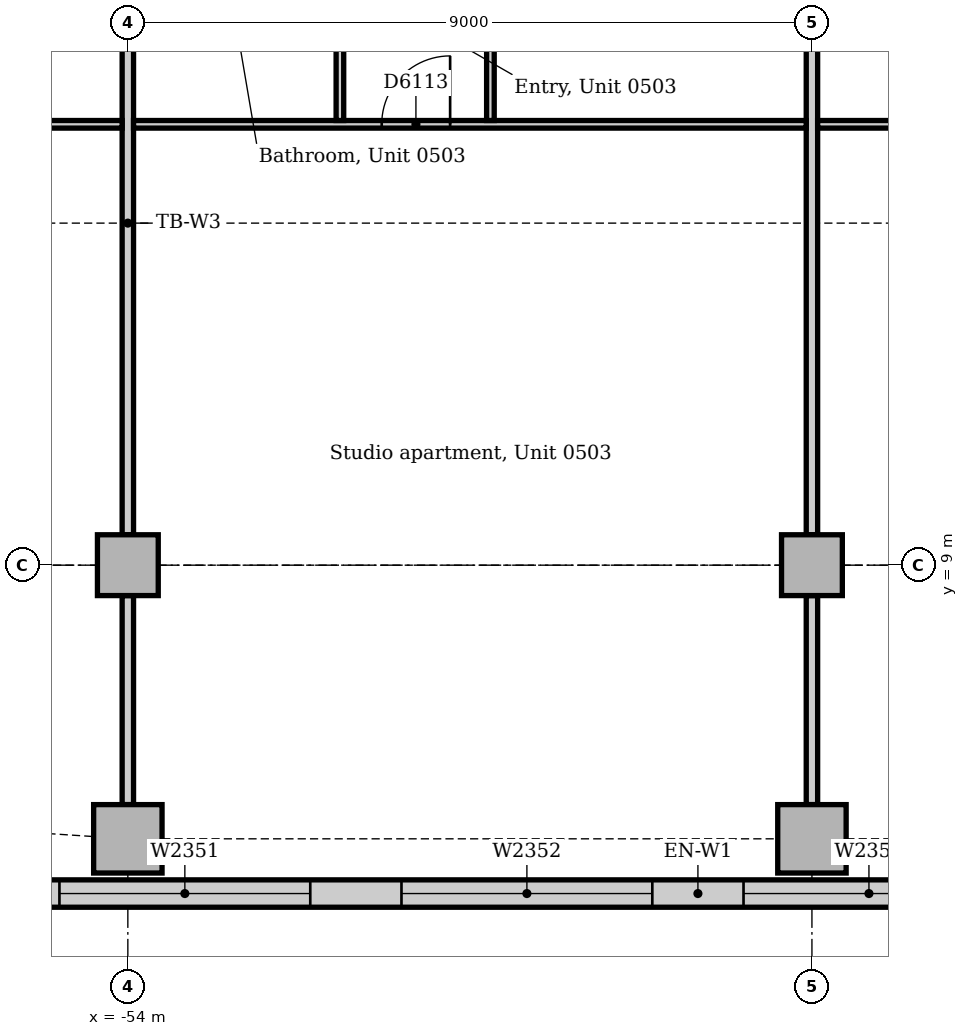
"""IFC4 building model, lengths in metres.
Left out: names, types, materials, properties, quantities, classifications, styles, units other than length and angle.
Written with IfcOpenShell. Run it as: python <this file> out.ifc"""

import sys

from ifc_helpers import new_model, si_unit, direction, frame, frame_2d, origin, origin_2d, place, context, subcontext, project, spatial, rectangle, extrude, element, fill, save


model = new_model("IFC4")
c1 = context("Model", 3, precision=1e-05, world=origin(), true_north=direction((0.0, 1.0)))
c2 = subcontext(c1, "Body", "Model", "MODEL_VIEW")
j1 = project(units=[si_unit("LENGTHUNIT", "METRE"), si_unit("PLANEANGLEUNIT", "RADIAN")], contexts=[c1])
p1 = place(None, origin())
s1 = spatial("IfcSite", under=j1, at=p1, CompositionType="ELEMENT")
p2 = place(p1, origin())
s2 = spatial("IfcBuilding", under=s1, at=p2, CompositionType="ELEMENT")
p3 = place(p2, frame((0.0, 0.0, 26.0)))
s3 = spatial("IfcBuildingStorey", under=s2, at=p3, CompositionType="ELEMENT", Elevation=26.0)
for number, where, z_axis, x_axis in (
    (1, (-54.0, 5.4, 0.0), (0.0, 0.0, 1.0), (1.0, 0.0, 0.0)),
    (2, (-45.0, 5.4, 0.0), (0.0, 0.0, 1.0), (1.0, 0.0, 0.0)),
):
    element("IfcColumn", number, at=place(p3, frame(where, z_axis=z_axis, x_axis=x_axis)), inside=s3, PredefinedType="COLUMN", context=c2, shape_type="SweptSolid", body=[
        extrude(rectangle(XDim=0.9, YDim=0.9, at=origin_2d()), origin(), (0.0, 0.0, 1.0), 3.85),
    ])
for number, where, z_axis, x_axis in (
    (3, (-54.0, 9.0, 0.0), (0.0, 0.0, 1.0), (1.0, 0.0, 0.0)),
    (4, (-45.0, 9.0, 0.0), (0.0, 0.0, 1.0), (1.0, 0.0, 0.0)),
):
    element("IfcColumn", number, at=place(p3, frame(where, z_axis=z_axis, x_axis=x_axis)), inside=s3, PredefinedType="COLUMN", context=c2, shape_type="SweptSolid", body=[
        extrude(rectangle(XDim=0.8, YDim=0.8, at=origin_2d()), origin(), (0.0, 0.0, 1.0), 3.85),
    ])
p4 = place(p3, frame((-61.757, 4.68, 0.0), z_axis=(0.0, 0.0, 1.0), x_axis=(1.0, 0.0, 0.0)))
e5 = element("IfcWall", 5, at=p4, inside=s3, PredefinedType="STANDARD", context=c2, shape_type="SweptSolid", body=[
    extrude(rectangle(XDim=30.515, YDim=0.36, at=frame_2d((15.257, 0.0))), origin(), (0.0, 0.0, 1.0), 3.85),
])
p5 = place(p4, frame((2.357, 0.0, 0.9)))
e6 = element("IfcOpeningElement", 6, at=p5, cuts=e5, PredefinedType="OPENING", context=c2, shape_type="SweptSolid", body=[
    extrude(rectangle(XDim=3.3, YDim=1.6, at=frame_2d((1.65, 0.8))), frame((0.0, 0.19, 0.0), z_axis=(0.0, -1.0, 0.0), x_axis=(1.0, 0.0, 0.0)), (0.0, 0.0, 1.0), 0.38),
])
p6 = place(p4, frame((6.857, 0.0, 0.9)))
e7 = element("IfcOpeningElement", 7, at=p6, cuts=e5, PredefinedType="OPENING", context=c2, shape_type="SweptSolid", body=[
    extrude(rectangle(XDim=3.3, YDim=1.6, at=frame_2d((1.65, 0.8))), frame((0.0, 0.19, 0.0), z_axis=(0.0, -1.0, 0.0), x_axis=(1.0, 0.0, 0.0)), (0.0, 0.0, 1.0), 0.38),
])
p7 = place(p4, frame((11.357, 0.0, 0.9)))
e8 = element("IfcOpeningElement", 8, at=p7, cuts=e5, PredefinedType="OPENING", context=c2, shape_type="SweptSolid", body=[
    extrude(rectangle(XDim=3.3, YDim=1.6, at=frame_2d((1.65, 0.8))), frame((0.0, 0.19, 0.0), z_axis=(0.0, -1.0, 0.0), x_axis=(1.0, 0.0, 0.0)), (0.0, 0.0, 1.0), 0.38),
])
p8 = place(p4, frame((15.857, 0.0, 0.9)))
e9 = element("IfcOpeningElement", 9, at=p8, cuts=e5, PredefinedType="OPENING", context=c2, shape_type="SweptSolid", body=[
    extrude(rectangle(XDim=3.3, YDim=1.6, at=frame_2d((1.65, 0.8))), frame((0.0, 0.19, 0.0), z_axis=(0.0, -1.0, 0.0), x_axis=(1.0, 0.0, 0.0)), (0.0, 0.0, 1.0), 0.38),
])
p9 = place(p4, frame((20.357, 0.0, 0.9)))
e10 = element("IfcOpeningElement", 10, at=p9, cuts=e5, PredefinedType="OPENING", context=c2, shape_type="SweptSolid", body=[
    extrude(rectangle(XDim=3.3, YDim=1.6, at=frame_2d((1.65, 0.8))), frame((0.0, 0.19, 0.0), z_axis=(0.0, -1.0, 0.0), x_axis=(1.0, 0.0, 0.0)), (0.0, 0.0, 1.0), 0.38),
])
p10 = place(p4, frame((24.857, 0.0, 0.9)))
e11 = element("IfcOpeningElement", 11, at=p10, cuts=e5, PredefinedType="OPENING", context=c2, shape_type="SweptSolid", body=[
    extrude(rectangle(XDim=3.3, YDim=1.6, at=frame_2d((1.65, 0.8))), frame((0.0, 0.19, 0.0), z_axis=(0.0, -1.0, 0.0), x_axis=(1.0, 0.0, 0.0)), (0.0, 0.0, 1.0), 0.38),
])
p11 = place(p3, frame((-54.0, 9.4, 0.0), z_axis=(0.0, 0.0, 1.0), x_axis=(0.0, 1.0, 0.0)))
e12 = element("IfcWall", 12, at=p11, inside=s3, PredefinedType="PARTITIONING", context=c2, shape_type="SweptSolid", body=[
    extrude(rectangle(XDim=8.2, YDim=0.15, at=frame_2d((4.1, 0.0))), origin(), (0.0, 0.0, 1.0), 3.158),
])
p12 = place(p3, frame((-54.0, 5.85, 0.0), z_axis=(0.0, 0.0, 1.0), x_axis=(0.0, 1.0, 0.0)))
e13 = element("IfcWall", 13, at=p12, inside=s3, PredefinedType="PARTITIONING", context=c2, shape_type="SweptSolid", body=[
    extrude(rectangle(XDim=2.75, YDim=0.15, at=frame_2d((1.375, 0.0))), origin(), (0.0, 0.0, 1.0), 3.652),
])
p13 = place(p3, frame((-45.0, 9.4, 0.0), z_axis=(0.0, 0.0, 1.0), x_axis=(0.0, 1.0, 0.0)))
e14 = element("IfcWall", 14, at=p13, inside=s3, PredefinedType="PARTITIONING", context=c2, shape_type="SweptSolid", body=[
    extrude(rectangle(XDim=8.2, YDim=0.15, at=frame_2d((4.1, 0.0))), origin(), (0.0, 0.0, 1.0), 3.158),
])
p14 = place(p3, frame((-45.0, 5.85, 0.0), z_axis=(0.0, 0.0, 1.0), x_axis=(0.0, 1.0, 0.0)))
e15 = element("IfcWall", 15, at=p14, inside=s3, PredefinedType="PARTITIONING", context=c2, shape_type="SweptSolid", body=[
    extrude(rectangle(XDim=2.75, YDim=0.15, at=frame_2d((1.375, 0.0))), origin(), (0.0, 0.0, 1.0), 3.652),
])
p15 = place(p3, frame((-61.05, 14.8, 0.0), z_axis=(0.0, 0.0, 1.0), x_axis=(1.0, 0.0, 0.0)))
e16 = element("IfcWall", 16, at=p15, inside=s3, PredefinedType="PARTITIONING", context=c2, shape_type="SweptSolid", body=[
    extrude(rectangle(XDim=6.975, YDim=0.1, at=frame_2d((3.487, 0.0))), origin(), (0.0, 0.0, 1.0), 3.85),
])
p16 = place(p15, frame((2.52, 0.0, 0.0)))
e17 = element("IfcOpeningElement", 17, at=p16, cuts=e16, PredefinedType="OPENING", context=c2, shape_type="SweptSolid", body=[
    extrude(rectangle(XDim=0.9, YDim=2.1, at=frame_2d((0.45, 1.05))), frame((0.0, 0.06, 0.0), z_axis=(0.0, -1.0, 0.0), x_axis=(1.0, 0.0, 0.0)), (0.0, 0.0, 1.0), 0.12),
])
p17 = place(p3, frame((-53.925, 14.8, 0.0), z_axis=(0.0, 0.0, 1.0), x_axis=(1.0, 0.0, 0.0)))
e18 = element("IfcWall", 18, at=p17, inside=s3, PredefinedType="PARTITIONING", context=c2, shape_type="SweptSolid", body=[
    extrude(rectangle(XDim=8.85, YDim=0.1, at=frame_2d((4.425, 0.0))), origin(), (0.0, 0.0, 1.0), 3.85),
])
p18 = place(p17, frame((3.265, 0.0, 0.0)))
e19 = element("IfcOpeningElement", 19, at=p18, cuts=e18, PredefinedType="OPENING", context=c2, shape_type="SweptSolid", body=[
    extrude(rectangle(XDim=0.9, YDim=2.1, at=frame_2d((0.45, 1.05))), frame((0.0, 0.06, 0.0), z_axis=(0.0, -1.0, 0.0), x_axis=(1.0, 0.0, 0.0)), (0.0, 0.0, 1.0), 0.12),
])
p19 = place(p3, frame((-44.925, 14.8, 0.0), z_axis=(0.0, 0.0, 1.0), x_axis=(1.0, 0.0, 0.0)))
e20 = element("IfcWall", 20, at=p19, inside=s3, PredefinedType="PARTITIONING", context=c2, shape_type="SweptSolid", body=[
    extrude(rectangle(XDim=8.85, YDim=0.1, at=frame_2d((4.425, 0.0))), origin(), (0.0, 0.0, 1.0), 3.85),
])
p20 = place(p19, frame((3.265, 0.0, 0.0)))
e21 = element("IfcOpeningElement", 21, at=p20, cuts=e20, PredefinedType="OPENING", context=c2, shape_type="SweptSolid", body=[
    extrude(rectangle(XDim=0.9, YDim=2.1, at=frame_2d((0.45, 1.05))), frame((0.0, 0.06, 0.0), z_axis=(0.0, -1.0, 0.0), x_axis=(1.0, 0.0, 0.0)), (0.0, 0.0, 1.0), 0.12),
])
p21 = place(p3, frame((-51.21, 14.85, 0.0), z_axis=(0.0, 0.0, 1.0), x_axis=(0.0, 1.0, 0.0)))
e22 = element("IfcWall", 22, at=p21, inside=s3, PredefinedType="PARTITIONING", context=c2, shape_type="SweptSolid", body=[
    extrude(rectangle(XDim=3.075, YDim=0.1, at=frame_2d((1.538, 0.0))), origin(), (0.0, 0.0, 1.0), 3.85),
])
p22 = place(p21, frame((1.1, 0.0, 0.0)))
e23 = element("IfcOpeningElement", 23, at=p22, cuts=e22, PredefinedType="OPENING", context=c2, shape_type="SweptSolid", body=[
    extrude(rectangle(XDim=0.9, YDim=2.1, at=frame_2d((0.45, 1.05))), frame((0.0, 0.06, 0.0), z_axis=(0.0, -1.0, 0.0), x_axis=(1.0, 0.0, 0.0)), (0.0, 0.0, 1.0), 0.12),
])
p23 = place(p3, frame((-49.23, 14.85, 0.0), z_axis=(0.0, 0.0, 1.0), x_axis=(0.0, 1.0, 0.0)))
e24 = element("IfcWall", 24, at=p23, inside=s3, PredefinedType="PARTITIONING", context=c2, shape_type="SweptSolid", body=[
    extrude(rectangle(XDim=3.075, YDim=0.1, at=frame_2d((1.538, 0.0))), origin(), (0.0, 0.0, 1.0), 3.85),
])
p24 = place(p23, frame((1.1, 0.0, 0.0)))
e25 = element("IfcOpeningElement", 25, at=p24, cuts=e24, PredefinedType="OPENING", context=c2, shape_type="SweptSolid", body=[
    extrude(rectangle(XDim=0.9, YDim=2.1, at=frame_2d((0.45, 1.05))), frame((0.0, 0.06, 0.0), z_axis=(0.0, -1.0, 0.0), x_axis=(1.0, 0.0, 0.0)), (0.0, 0.0, 1.0), 0.12),
])
p25 = place(p6, origin())
e26 = element("IfcWindow", 26, at=p25, inside=s3, PartitioningType="SINGLE_PANEL", PredefinedType="WINDOW", context=c2, shape_type="SweptSolid", body=[
    extrude(rectangle(XDim=3.3, YDim=1.6, at=frame_2d((1.65, 0.8))), frame((0.0, 0.13, 0.0), z_axis=(0.0, -1.0, 0.0), x_axis=(1.0, 0.0, 0.0)), (0.0, 0.0, 1.0), 0.06),
])
fill(e7, e26)
p26 = place(p7, origin())
e27 = element("IfcWindow", 27, at=p26, inside=s3, PartitioningType="SINGLE_PANEL", PredefinedType="WINDOW", context=c2, shape_type="SweptSolid", body=[
    extrude(rectangle(XDim=3.3, YDim=1.6, at=frame_2d((1.65, 0.8))), frame((0.0, 0.13, 0.0), z_axis=(0.0, -1.0, 0.0), x_axis=(1.0, 0.0, 0.0)), (0.0, 0.0, 1.0), 0.06),
])
fill(e8, e27)
p27 = place(p8, origin())
e28 = element("IfcWindow", 28, at=p27, inside=s3, PartitioningType="SINGLE_PANEL", PredefinedType="WINDOW", context=c2, shape_type="SweptSolid", body=[
    extrude(rectangle(XDim=3.3, YDim=1.6, at=frame_2d((1.65, 0.8))), frame((0.0, 0.13, 0.0), z_axis=(0.0, -1.0, 0.0), x_axis=(1.0, 0.0, 0.0)), (0.0, 0.0, 1.0), 0.06),
])
fill(e9, e28)
p28 = place(p18, origin())
e29 = element("IfcDoor", 29, at=p28, inside=s3, OperationType="SINGLE_SWING_RIGHT", PredefinedType="DOOR", context=c2, shape_type="SweptSolid", body=[
    extrude(rectangle(XDim=0.9, YDim=2.1, at=frame_2d((0.45, 1.05))), frame((0.0, 0.025, 0.0), z_axis=(0.0, -1.0, 0.0), x_axis=(1.0, 0.0, 0.0)), (0.0, 0.0, 1.0), 0.05),
])
fill(e19, e29)
save(model, sys.argv[1])
